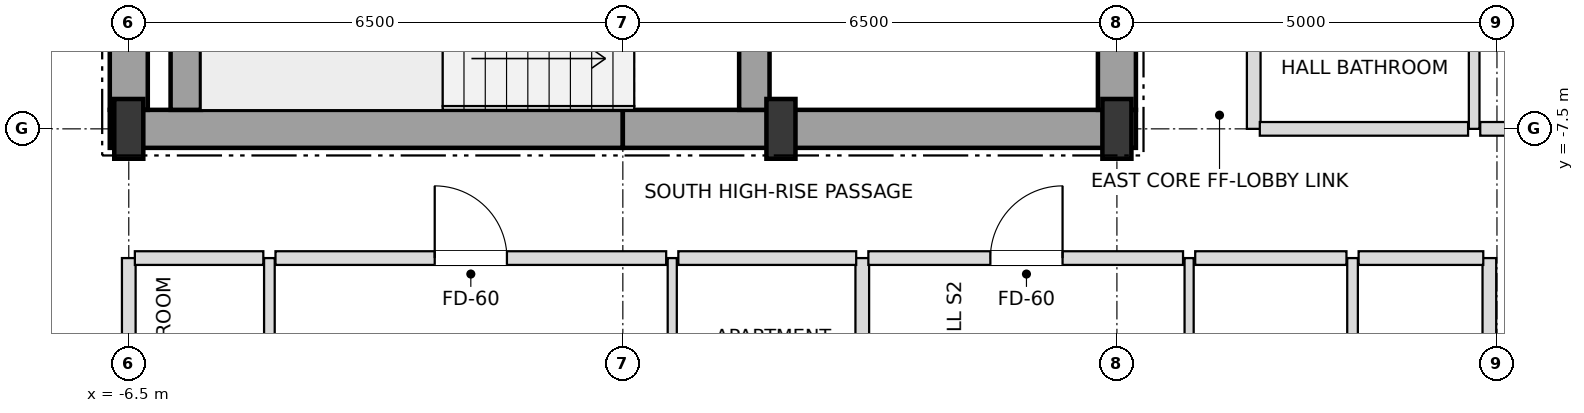
"""IFC4 building model, lengths in metres.
Left out: names, types, materials, properties, quantities, classifications, styles, units other than length and angle.
Written with IfcOpenShell. Run it as: python <this file> out.ifc"""

import sys

from ifc_helpers import new_model, si_unit, direction, frame, frame_2d, origin, origin_2d, place, context, subcontext, project, spatial, rectangle, i_section, extrude, element, fill, save


model = new_model("IFC4")
c1 = context("Model", 3, precision=1e-05, world=origin(), true_north=direction((0.0, 1.0)))
c2 = subcontext(c1, "Body", "Model", "MODEL_VIEW")
j1 = project(units=[si_unit("LENGTHUNIT", "METRE"), si_unit("PLANEANGLEUNIT", "RADIAN")], contexts=[c1])
p1 = place(None, origin())
s1 = spatial("IfcSite", under=j1, at=p1, CompositionType="ELEMENT")
p2 = place(p1, origin())
s2 = spatial("IfcBuilding", under=s1, at=p2, CompositionType="ELEMENT")
p3 = place(p2, frame((0.0, 0.0, 236.7)))
s3 = spatial("IfcBuildingStorey", under=s2, at=p3, CompositionType="ELEMENT", Elevation=236.7)
for number, where, z_axis, x_axis in (
    (1, (-6.5, -7.5, 0.0), (0.0, 0.0, 1.0), (1.0, 0.0, 0.0)),
    (2, (2.08, -7.5, 0.0), (0.0, 0.0, 1.0), (1.0, 0.0, 0.0)),
    (3, (6.5, -7.5, 0.0), (0.0, 0.0, 1.0), (1.0, 0.0, 0.0)),
):
    element("IfcColumn", number, at=place(p3, frame(where, z_axis=z_axis, x_axis=x_axis)), inside=s3, PredefinedType="COLUMN", context=c2, shape_type="SweptSolid", body=[
        extrude(i_section(OverallWidth=0.382, OverallDepth=0.786, WebThickness=0.02, FlangeThickness=0.033, at=origin_2d()), origin(), (0.0, 0.0, 1.0), 3.6),
    ])
for number, where, z_axis, x_axis in (
    (4, (-6.75, -7.5, 0.0), (0.0, 0.0, 1.0), (1.0, 0.0, 0.0)),
    (5, (0.0, -7.5, 0.0), (0.0, 0.0, 1.0), (1.0, 0.0, 0.0)),
):
    element("IfcWall", number, at=place(p3, frame(where, z_axis=z_axis, x_axis=x_axis)), inside=s3, PredefinedType="SHEAR", context=c2, shape_type="SweptSolid", body=[
        extrude(rectangle(XDim=6.75, YDim=0.5, at=frame_2d((3.375, 0.0))), origin(), (0.0, 0.0, 1.0), 3.38),
    ])
p4 = place(p3, frame((-6.5, -7.25, 0.0), z_axis=(0.0, 0.0, 1.0), x_axis=(0.0, 1.0, 0.0)))
e6 = element("IfcWall", 6, at=p4, inside=s3, PredefinedType="SHEAR", context=c2, shape_type="SweptSolid", body=[
    extrude(rectangle(XDim=3.55, YDim=0.5, at=frame_2d((1.775, 0.0))), origin(), (0.0, 0.0, 1.0), 3.38),
])
p5 = place(p3, frame((6.5, -7.25, 0.0), z_axis=(0.0, 0.0, 1.0), x_axis=(0.0, 1.0, 0.0)))
e7 = element("IfcWall", 7, at=p5, inside=s3, PredefinedType="SHEAR", context=c2, shape_type="SweptSolid", body=[
    extrude(rectangle(XDim=5.75, YDim=0.5, at=frame_2d((2.875, 0.0))), origin(), (0.0, 0.0, 1.0), 3.38),
])
p6 = place(p5, frame((0.85, 0.0, 0.0)))
e8 = element("IfcOpeningElement", 8, at=p6, cuts=e7, PredefinedType="OPENING", context=c2, shape_type="SweptSolid", body=[
    extrude(rectangle(XDim=1.05, YDim=2.15, at=frame_2d((0.525, 1.075))), frame((0.0, 0.26, 0.0), z_axis=(0.0, -1.0, 0.0), x_axis=(1.0, 0.0, 0.0)), (0.0, 0.0, 1.0), 0.52),
])
p7 = place(p3, frame((-5.75, -7.25, 0.0), z_axis=(0.0, 0.0, 1.0), x_axis=(0.0, 1.0, 0.0)))
e9 = element("IfcWall", 9, at=p7, inside=s3, PredefinedType="SHEAR", context=c2, shape_type="SweptSolid", body=[
    extrude(rectangle(XDim=2.9, YDim=0.4, at=frame_2d((1.45, 0.0))), origin(), (0.0, 0.0, 1.0), 3.38),
])
p8 = place(p3, frame((1.73, -7.25, 0.0), z_axis=(0.0, 0.0, 1.0), x_axis=(0.0, 1.0, 0.0)))
e10 = element("IfcWall", 10, at=p8, inside=s3, PredefinedType="SHEAR", context=c2, shape_type="SweptSolid", body=[
    extrude(rectangle(XDim=3.3, YDim=0.4, at=frame_2d((1.65, 0.0))), origin(), (0.0, 0.0, 1.0), 3.38),
])
p9 = place(p8, frame((0.9, 0.0, 0.0)))
e11 = element("IfcOpeningElement", 11, at=p9, cuts=e10, PredefinedType="OPENING", context=c2, shape_type="SweptSolid", body=[
    extrude(rectangle(XDim=1.05, YDim=2.15, at=frame_2d((0.525, 1.075))), frame((0.0, 0.21, 0.0), z_axis=(0.0, -1.0, 0.0), x_axis=(1.0, 0.0, 0.0)), (0.0, 0.0, 1.0), 0.42),
])
p10 = place(p3, frame((-6.5, -19.9, 0.0), z_axis=(0.0, 0.0, 1.0), x_axis=(0.0, 1.0, 0.0)))
e12 = element("IfcWall", 12, at=p10, inside=s3, PredefinedType="PARTITIONING", context=c2, shape_type="SweptSolid", body=[
    extrude(rectangle(XDim=10.7, YDim=0.18, at=frame_2d((5.35, 0.0))), origin(), (0.0, 0.0, 1.0), 2.826),
])
p11 = place(p3, frame((-4.65, -13.9, 0.0), z_axis=(0.0, 0.0, 1.0), x_axis=(0.0, 1.0, 0.0)))
e13 = element("IfcWall", 13, at=p11, inside=s3, PredefinedType="PARTITIONING", context=c2, shape_type="SweptSolid", body=[
    extrude(rectangle(XDim=4.7, YDim=0.14, at=frame_2d((2.35, 0.0))), origin(), (0.0, 0.0, 1.0), 3.38),
])
p12 = place(p11, frame((1.9, 0.0, 0.0)))
e14 = element("IfcOpeningElement", 14, at=p12, cuts=e13, PredefinedType="OPENING", context=c2, shape_type="SweptSolid", body=[
    extrude(rectangle(XDim=0.9, YDim=2.1, at=frame_2d((0.45, 1.05))), frame((0.0, 0.08, 0.0), z_axis=(0.0, -1.0, 0.0), x_axis=(1.0, 0.0, 0.0)), (0.0, 0.0, 1.0), 0.16),
])
p13 = place(p3, frame((0.65, -13.9, 0.0), z_axis=(0.0, 0.0, 1.0), x_axis=(0.0, 1.0, 0.0)))
e15 = element("IfcWall", 15, at=p13, inside=s3, PredefinedType="PARTITIONING", context=c2, shape_type="SweptSolid", body=[
    extrude(rectangle(XDim=4.7, YDim=0.12, at=frame_2d((2.35, 0.0))), origin(), (0.0, 0.0, 1.0), 3.38),
])
p14 = place(p13, frame((1.875, 0.0, 0.0)))
e16 = element("IfcOpeningElement", 16, at=p14, cuts=e15, PredefinedType="OPENING", context=c2, shape_type="SweptSolid", body=[
    extrude(rectangle(XDim=0.95, YDim=2.1, at=frame_2d((0.475, 1.05))), frame((0.0, 0.07, 0.0), z_axis=(0.0, -1.0, 0.0), x_axis=(1.0, 0.0, 0.0)), (0.0, 0.0, 1.0), 0.14),
])
p15 = place(p3, frame((3.15, -19.9, 0.0), z_axis=(0.0, 0.0, 1.0), x_axis=(0.0, 1.0, 0.0)))
e17 = element("IfcWall", 17, at=p15, inside=s3, PredefinedType="PARTITIONING", context=c2, shape_type="SweptSolid", body=[
    extrude(rectangle(XDim=10.7, YDim=0.18, at=frame_2d((5.35, 0.0))), origin(), (0.0, 0.0, 1.0), 3.018),
])
p16 = place(p3, frame((7.45, -19.9, 0.0), z_axis=(0.0, 0.0, 1.0), x_axis=(0.0, 1.0, 0.0)))
e18 = element("IfcWall", 18, at=p16, inside=s3, PredefinedType="PARTITIONING", context=c2, shape_type="SweptSolid", body=[
    extrude(rectangle(XDim=10.7, YDim=0.12, at=frame_2d((5.35, 0.0))), origin(), (0.0, 0.0, 1.0), 2.826),
])
p17 = place(p16, frame((7.875, 0.0, 0.0)))
e19 = element("IfcOpeningElement", 19, at=p17, cuts=e18, PredefinedType="OPENING", context=c2, shape_type="SweptSolid", body=[
    extrude(rectangle(XDim=0.95, YDim=2.1, at=frame_2d((0.475, 1.05))), frame((0.0, 0.07, 0.0), z_axis=(0.0, -1.0, 0.0), x_axis=(1.0, 0.0, 0.0)), (0.0, 0.0, 1.0), 0.14),
])
p18 = place(p16, frame((2.55, 0.0, 0.0)))
e20 = element("IfcOpeningElement", 20, at=p18, cuts=e18, PredefinedType="OPENING", context=c2, shape_type="SweptSolid", body=[
    extrude(rectangle(XDim=0.9, YDim=2.1, at=frame_2d((0.45, 1.05))), frame((0.0, 0.07, 0.0), z_axis=(0.0, -1.0, 0.0), x_axis=(1.0, 0.0, 0.0)), (0.0, 0.0, 1.0), 0.14),
])
p19 = place(p3, frame((8.3, -7.5, 0.0), z_axis=(0.0, 0.0, 1.0), x_axis=(0.0, 1.0, 0.0)))
e21 = element("IfcWall", 21, at=p19, inside=s3, PredefinedType="PARTITIONING", context=c2, shape_type="SweptSolid", body=[
    extrude(rectangle(XDim=15.0, YDim=0.18, at=frame_2d((7.5, 0.0))), origin(), (0.0, 0.0, 1.0), 3.38),
])
p20 = place(p19, frame((2.355, 0.0, 0.0)))
e22 = element("IfcOpeningElement", 22, at=p20, cuts=e21, PredefinedType="OPENING", context=c2, shape_type="SweptSolid", body=[
    extrude(rectangle(XDim=0.95, YDim=2.15, at=frame_2d((0.475, 1.075))), frame((0.0, 0.1, 0.0), z_axis=(0.0, -1.0, 0.0), x_axis=(1.0, 0.0, 0.0)), (0.0, 0.0, 1.0), 0.2),
])
p21 = place(p3, frame((9.6, -13.9, 0.0), z_axis=(0.0, 0.0, 1.0), x_axis=(0.0, 1.0, 0.0)))
e23 = element("IfcWall", 23, at=p21, inside=s3, PredefinedType="PARTITIONING", context=c2, shape_type="SweptSolid", body=[
    extrude(rectangle(XDim=4.7, YDim=0.14, at=frame_2d((2.35, 0.0))), origin(), (0.0, 0.0, 1.0), 2.826),
])
p22 = place(p21, frame((1.9, 0.0, 0.0)))
e24 = element("IfcOpeningElement", 24, at=p22, cuts=e23, PredefinedType="OPENING", context=c2, shape_type="SweptSolid", body=[
    extrude(rectangle(XDim=0.9, YDim=2.1, at=frame_2d((0.45, 1.05))), frame((0.0, 0.08, 0.0), z_axis=(0.0, -1.0, 0.0), x_axis=(1.0, 0.0, 0.0)), (0.0, 0.0, 1.0), 0.16),
])
p23 = place(p3, frame((11.2, -7.5, 0.0), z_axis=(0.0, 0.0, 1.0), x_axis=(0.0, 1.0, 0.0)))
e25 = element("IfcWall", 25, at=p23, inside=s3, PredefinedType="PARTITIONING", context=c2, shape_type="SweptSolid", body=[
    extrude(rectangle(XDim=15.0, YDim=0.14, at=frame_2d((7.5, 0.0))), origin(), (0.0, 0.0, 1.0), 3.38),
])
p24 = place(p23, frame((3.475, 0.0, 0.0)))
e26 = element("IfcOpeningElement", 26, at=p24, cuts=e25, PredefinedType="OPENING", context=c2, shape_type="SweptSolid", body=[
    extrude(rectangle(XDim=0.95, YDim=2.1, at=frame_2d((0.475, 1.05))), frame((0.0, 0.08, 0.0), z_axis=(0.0, -1.0, 0.0), x_axis=(1.0, 0.0, 0.0)), (0.0, 0.0, 1.0), 0.16),
])
p25 = place(p3, frame((11.4, -14.27, 0.0), z_axis=(0.0, 0.0, 1.0), x_axis=(0.0, 1.0, 0.0)))
e27 = element("IfcWall", 27, at=p25, inside=s3, PredefinedType="PARTITIONING", context=c2, shape_type="SweptSolid", body=[
    extrude(rectangle(XDim=5.07, YDim=0.18, at=frame_2d((2.535, 0.0))), origin(), (0.0, 0.0, 1.0), 2.748),
])
p26 = place(p3, frame((-6.42, -9.2, 0.0), z_axis=(0.0, 0.0, 1.0), x_axis=(1.0, 0.0, 0.0)))
e28 = element("IfcWall", 28, at=p26, inside=s3, PredefinedType="PARTITIONING", context=c2, shape_type="SweptSolid", body=[
    extrude(rectangle(XDim=1.69, YDim=0.18, at=frame_2d((0.845, 0.0))), origin(), (0.0, 0.0, 1.0), 3.38),
])
p27 = place(p3, frame((-4.57, -9.2, 0.0), z_axis=(0.0, 0.0, 1.0), x_axis=(1.0, 0.0, 0.0)))
e29 = element("IfcWall", 29, at=p27, inside=s3, PredefinedType="PARTITIONING", context=c2, shape_type="SweptSolid", body=[
    extrude(rectangle(XDim=5.14, YDim=0.18, at=frame_2d((2.57, 0.0))), origin(), (0.0, 0.0, 1.0), 3.38),
])
p28 = place(p27, frame((2.095, 0.0, 0.0)))
e30 = element("IfcOpeningElement", 30, at=p28, cuts=e29, PredefinedType="OPENING", context=c2, shape_type="SweptSolid", body=[
    extrude(rectangle(XDim=0.95, YDim=2.15, at=frame_2d((0.475, 1.075))), frame((0.0, 0.1, 0.0), z_axis=(0.0, -1.0, 0.0), x_axis=(1.0, 0.0, 0.0)), (0.0, 0.0, 1.0), 0.2),
])
p29 = place(p3, frame((0.73, -9.2, 0.0), z_axis=(0.0, 0.0, 1.0), x_axis=(1.0, 0.0, 0.0)))
e31 = element("IfcWall", 31, at=p29, inside=s3, PredefinedType="PARTITIONING", context=c2, shape_type="SweptSolid", body=[
    extrude(rectangle(XDim=2.34, YDim=0.18, at=frame_2d((1.17, 0.0))), origin(), (0.0, 0.0, 1.0), 3.38),
])
p30 = place(p3, frame((3.23, -9.2, 0.0), z_axis=(0.0, 0.0, 1.0), x_axis=(1.0, 0.0, 0.0)))
e32 = element("IfcWall", 32, at=p30, inside=s3, PredefinedType="PARTITIONING", context=c2, shape_type="SweptSolid", body=[
    extrude(rectangle(XDim=4.14, YDim=0.18, at=frame_2d((2.07, 0.0))), origin(), (0.0, 0.0, 1.0), 2.826),
])
p31 = place(p30, frame((1.605, 0.0, 0.0)))
e33 = element("IfcOpeningElement", 33, at=p31, cuts=e32, PredefinedType="OPENING", context=c2, shape_type="SweptSolid", body=[
    extrude(rectangle(XDim=0.95, YDim=2.15, at=frame_2d((0.475, 1.075))), frame((0.0, 0.1, 0.0), z_axis=(0.0, -1.0, 0.0), x_axis=(1.0, 0.0, 0.0)), (0.0, 0.0, 1.0), 0.2),
])
p32 = place(p3, frame((7.53, -9.2, 0.0), z_axis=(0.0, 0.0, 1.0), x_axis=(1.0, 0.0, 0.0)))
e34 = element("IfcWall", 34, at=p32, inside=s3, PredefinedType="PARTITIONING", context=c2, shape_type="SweptSolid", body=[
    extrude(rectangle(XDim=1.99, YDim=0.18, at=frame_2d((0.995, 0.0))), origin(), (0.0, 0.0, 1.0), 3.38),
])
p33 = place(p3, frame((9.68, -9.2, 0.0), z_axis=(0.0, 0.0, 1.0), x_axis=(1.0, 0.0, 0.0)))
e35 = element("IfcWall", 35, at=p33, inside=s3, PredefinedType="PARTITIONING", context=c2, shape_type="SweptSolid", body=[
    extrude(rectangle(XDim=1.64, YDim=0.18, at=frame_2d((0.82, 0.0))), origin(), (0.0, 0.0, 1.0), 3.38),
])
p34 = place(p3, frame((8.38, -7.5, 0.0), z_axis=(0.0, 0.0, 1.0), x_axis=(1.0, 0.0, 0.0)))
e36 = element("IfcWall", 36, at=p34, inside=s3, PredefinedType="PARTITIONING", context=c2, shape_type="SweptSolid", body=[
    extrude(rectangle(XDim=2.74, YDim=0.18, at=frame_2d((1.37, 0.0))), origin(), (0.0, 0.0, 1.0), 2.826),
])
p35 = place(p3, frame((11.28, -7.5, 0.0), z_axis=(0.0, 0.0, 1.0), x_axis=(1.0, 0.0, 0.0)))
e37 = element("IfcWall", 37, at=p35, inside=s3, PredefinedType="PARTITIONING", context=c2, shape_type="SweptSolid", body=[
    extrude(rectangle(XDim=5.62, YDim=0.18, at=frame_2d((2.81, 0.0))), origin(), (0.0, 0.0, 1.0), 2.826),
])
p36 = place(p28, origin())
e38 = element("IfcDoor", 38, at=p36, inside=s3, OperationType="SINGLE_SWING_LEFT", PredefinedType="DOOR", context=c2, shape_type="SweptSolid", body=[
    extrude(rectangle(XDim=0.95, YDim=2.15, at=frame_2d((0.475, 1.075))), frame((0.0, 0.025, 0.0), z_axis=(0.0, -1.0, 0.0), x_axis=(1.0, 0.0, 0.0)), (0.0, 0.0, 1.0), 0.05),
])
fill(e30, e38)
p37 = place(p31, origin())
e39 = element("IfcDoor", 39, at=p37, inside=s3, OperationType="SINGLE_SWING_RIGHT", PredefinedType="DOOR", context=c2, shape_type="SweptSolid", body=[
    extrude(rectangle(XDim=0.95, YDim=2.15, at=frame_2d((0.475, 1.075))), frame((0.0, 0.025, 0.0), z_axis=(0.0, -1.0, 0.0), x_axis=(1.0, 0.0, 0.0)), (0.0, 0.0, 1.0), 0.05),
])
fill(e33, e39)
save(model, sys.argv[1])
